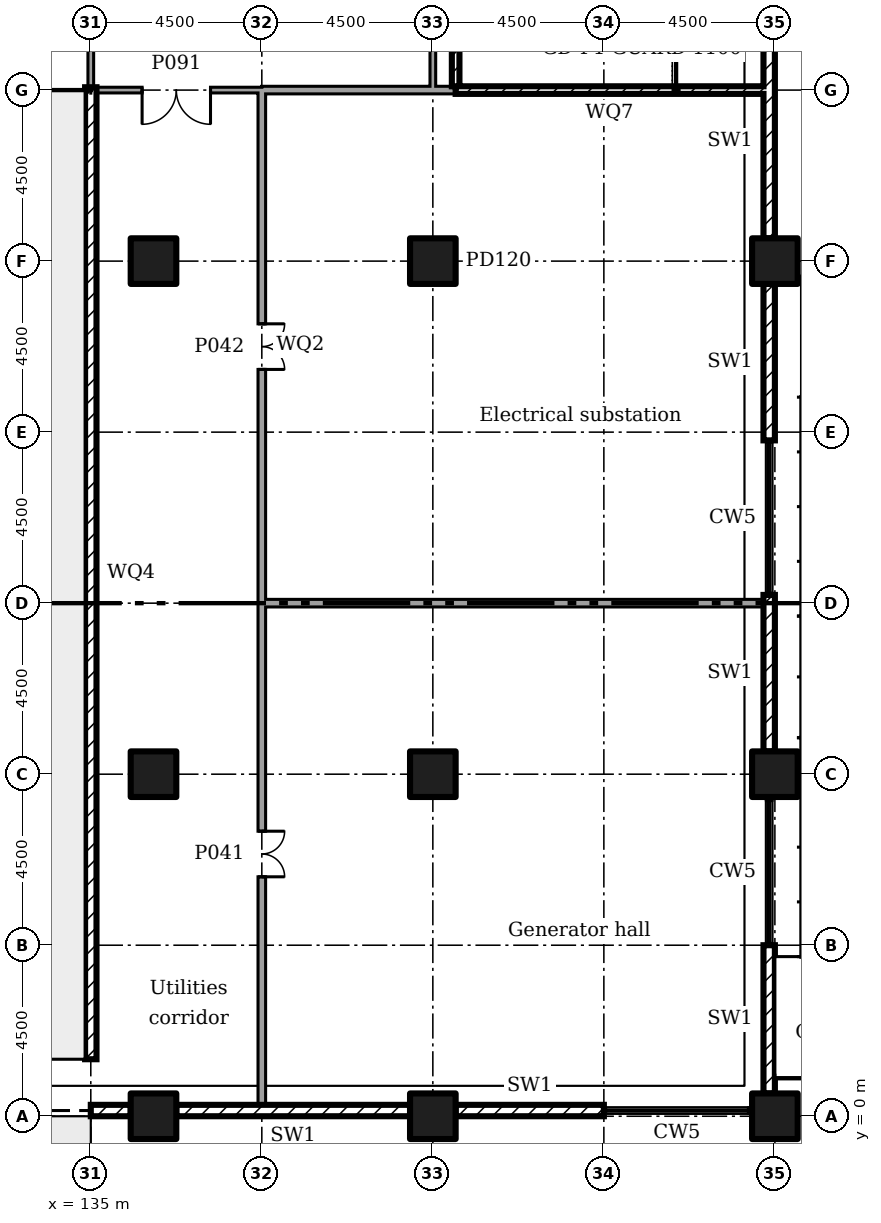
"""IFC4 building model, lengths in metres.
Left out: names, types, materials, properties, quantities, classifications, styles, units other than length and angle.
Written with IfcOpenShell. Run it as: python <this file> out.ifc"""

import sys

from ifc_helpers import new_model, si_unit, direction, frame, frame_2d, origin, origin_2d, place, context, subcontext, project, spatial, rectangle, extrude, element, fill, save


model = new_model("IFC4")
c1 = context("Model", 3, precision=1e-05, world=origin(), true_north=direction((0.0, 1.0)))
c2 = subcontext(c1, "Body", "Model", "MODEL_VIEW")
j1 = project(units=[si_unit("LENGTHUNIT", "METRE"), si_unit("PLANEANGLEUNIT", "RADIAN")], contexts=[c1])
p1 = place(None, origin())
s1 = spatial("IfcSite", under=j1, at=p1, CompositionType="ELEMENT")
p2 = place(p1, origin())
s2 = spatial("IfcBuilding", under=s1, at=p2, CompositionType="ELEMENT")
p3 = place(p2, origin())
s3 = spatial("IfcBuildingStorey", under=s2, at=p3, CompositionType="ELEMENT", Elevation=0.0)
for number, where in (
    (1, (136.65, 0.0, 0.0)),
    (2, (136.65, 9.0, 0.0)),
    (3, (136.65, 22.5, 0.0)),
    (4, (144.0, 0.0, 0.0)),
    (5, (144.0, 9.0, 0.0)),
    (6, (144.0, 22.5, 0.0)),
    (7, (153.0, 0.0, 0.0)),
    (8, (153.0, 9.0, 0.0)),
    (9, (153.0, 22.5, 0.0)),
):
    element("IfcColumn", number, at=place(p3, frame(where)), inside=s3, PredefinedType="COLUMN", context=c2, shape_type="SweptSolid", body=[
        extrude(rectangle(XDim=1.2, YDim=1.2, at=origin_2d()), origin(), (0.0, 0.0, 1.0), 6.0),
    ])
p4 = place(p3, frame((125.5, 0.15, 0.0)))
e10 = element("IfcWall", 10, at=p4, inside=s3, PredefinedType="ELEMENTEDWALL", context=c2, shape_type="SweptSolid", body=[
    extrude(rectangle(XDim=10.0, YDim=0.3, at=frame_2d((5.0, 0.0))), origin(), (0.0, 0.0, 1.0), 4.05),
])
p5 = place(p4, frame((0.5, 0.0, 0.0)))
e11 = element("IfcOpeningElement", 11, at=p5, cuts=e10, PredefinedType="OPENING", context=c2, shape_type="SweptSolid", body=[
    extrude(rectangle(XDim=9.0, YDim=3.5, at=frame_2d((4.5, 1.75))), frame((0.0, 0.16, 0.0), z_axis=(0.0, -1.0, 0.0), x_axis=(1.0, 0.0, 0.0)), (0.0, 0.0, 1.0), 0.32),
])
p6 = place(p3, frame((135.5, 0.15, 0.0)))
e12 = element("IfcWall", 12, at=p6, inside=s3, PredefinedType="ELEMENTEDWALL", context=c2, shape_type="SweptSolid", body=[
    extrude(rectangle(XDim=0.55, YDim=0.3, at=frame_2d((0.275, 0.0))), origin(), (0.0, 0.0, 1.0), 4.05),
])
p7 = place(p3, frame((137.25, 0.15, 0.0)))
e13 = element("IfcWall", 13, at=p7, inside=s3, PredefinedType="ELEMENTEDWALL", context=c2, shape_type="SweptSolid", body=[
    extrude(rectangle(XDim=6.15, YDim=0.3, at=frame_2d((3.075, 0.0))), origin(), (0.0, 0.0, 1.0), 5.55),
])
p8 = place(p3, frame((144.6, 0.15, 0.0)))
e14 = element("IfcWall", 14, at=p8, inside=s3, PredefinedType="ELEMENTEDWALL", context=c2, shape_type="SweptSolid", body=[
    extrude(rectangle(XDim=3.9, YDim=0.3, at=frame_2d((1.95, 0.0))), origin(), (0.0, 0.0, 1.0), 5.55),
])
p9 = place(p3, frame((152.85, 0.6, 0.0), z_axis=(0.0, 0.0, 1.0), x_axis=(0.0, 1.0, 0.0)))
e15 = element("IfcWall", 15, at=p9, inside=s3, PredefinedType="ELEMENTEDWALL", context=c2, shape_type="SweptSolid", body=[
    extrude(rectangle(XDim=3.9, YDim=0.3, at=frame_2d((1.95, 0.0))), origin(), (0.0, 0.0, 1.0), 5.55),
])
for number, where, z_axis, x_axis in (
    (16, (152.85, 9.6, 0.0), (0.0, 0.0, 1.0), (0.0, 1.0, 0.0)),
    (17, (152.85, 17.783, 0.0), (0.0, 0.0, 1.0), (0.0, 1.0, 0.0)),
):
    element("IfcWall", number, at=place(p3, frame(where, z_axis=z_axis, x_axis=x_axis)), inside=s3, PredefinedType="ELEMENTEDWALL", context=c2, shape_type="SweptSolid", body=[
        extrude(rectangle(XDim=4.116, YDim=0.3, at=frame_2d((2.058, 0.0))), origin(), (0.0, 0.0, 1.0), 5.55),
    ])
p10 = place(p3, frame((152.85, 23.1, 0.0), z_axis=(0.0, 0.0, 1.0), x_axis=(0.0, 1.0, 0.0)))
e18 = element("IfcWall", 18, at=p10, inside=s3, PredefinedType="ELEMENTEDWALL", context=c2, shape_type="SweptSolid", body=[
    extrude(rectangle(XDim=5.1, YDim=0.3, at=frame_2d((2.55, 0.0))), origin(), (0.0, 0.0, 1.0), 5.55),
])
p11 = place(p3, frame((139.5, 0.3, 0.0), z_axis=(0.0, 0.0, 1.0), x_axis=(0.0, 1.0, 0.0)))
e19 = element("IfcWall", 19, at=p11, inside=s3, PredefinedType="SOLIDWALL", context=c2, shape_type="SweptSolid", body=[
    extrude(rectangle(XDim=13.3, YDim=0.2, at=frame_2d((6.65, 0.0))), origin(), (0.0, 0.0, 1.0), 5.55),
])
p12 = place(p11, frame((6.0, 0.0, 0.0)))
e20 = element("IfcOpeningElement", 20, at=p12, cuts=e19, PredefinedType="OPENING", context=c2, shape_type="SweptSolid", body=[
    extrude(rectangle(XDim=1.2, YDim=2.1, at=frame_2d((0.6, 1.05))), frame((0.0, 0.11, 0.0), z_axis=(0.0, -1.0, 0.0), x_axis=(1.0, 0.0, 0.0)), (0.0, 0.0, 1.0), 0.22),
])
p13 = place(p3, frame((139.5, 13.5, 0.0), z_axis=(0.0, 0.0, 1.0), x_axis=(0.0, 1.0, 0.0)))
e21 = element("IfcWall", 21, at=p13, inside=s3, PredefinedType="SOLIDWALL", context=c2, shape_type="SweptSolid", body=[
    extrude(rectangle(XDim=13.575, YDim=0.2, at=frame_2d((6.788, 0.0))), origin(), (0.0, 0.0, 1.0), 5.55),
])
p14 = place(p13, frame((6.15, 0.0, 0.0)))
e22 = element("IfcOpeningElement", 22, at=p14, cuts=e21, PredefinedType="OPENING", context=c2, shape_type="SweptSolid", body=[
    extrude(rectangle(XDim=1.2, YDim=2.1, at=frame_2d((0.6, 1.05))), frame((0.0, 0.11, 0.0), z_axis=(0.0, -1.0, 0.0), x_axis=(1.0, 0.0, 0.0)), (0.0, 0.0, 1.0), 0.22),
])
p15 = place(p3, frame((135.15, 27.0, 0.0)))
e23 = element("IfcWall", 23, at=p15, inside=s3, PredefinedType="PARTITIONING", context=c2, shape_type="SweptSolid", body=[
    extrude(rectangle(XDim=4.25, YDim=0.15, at=frame_2d((2.125, 0.0))), origin(), (0.0, 0.0, 1.0), 5.55),
])
p16 = place(p15, frame((1.2, 0.0, 0.0)))
e24 = element("IfcOpeningElement", 24, at=p16, cuts=e23, PredefinedType="OPENING", context=c2, shape_type="SweptSolid", body=[
    extrude(rectangle(XDim=1.8, YDim=2.1, at=frame_2d((0.9, 1.05))), frame((0.0, 0.085, 0.0), z_axis=(0.0, -1.0, 0.0), x_axis=(1.0, 0.0, 0.0)), (0.0, 0.0, 1.0), 0.17),
])
p17 = place(p3, frame((139.6, 13.5, 0.0)))
e25 = element("IfcWall", 25, at=p17, inside=s3, PredefinedType="SOLIDWALL", context=c2, shape_type="SweptSolid", body=[
    extrude(rectangle(XDim=13.1, YDim=0.2, at=frame_2d((6.55, 0.0))), origin(), (0.0, 0.0, 1.0), 5.55),
])
p18 = place(p3, frame((139.5, 27.0, 0.0)))
e26 = element("IfcWall", 26, at=p18, inside=s3, PredefinedType="SOLIDWALL", context=c2, shape_type="SweptSolid", body=[
    extrude(rectangle(XDim=4.575, YDim=0.2, at=frame_2d((2.288, 0.0))), origin(), (0.0, 0.0, 1.0), 5.55),
])
p19 = place(p3, frame((144.0, 27.0, 0.0)))
e27 = element("IfcWall", 27, at=p19, inside=s3, PredefinedType="SOLIDWALL", context=c2, shape_type="SweptSolid", body=[
    extrude(rectangle(XDim=0.7, YDim=0.2, at=frame_2d((0.35, 0.0))), origin(), (0.0, 0.0, 1.0), 5.55),
])
p20 = place(p3, frame((144.6, 27.0, 0.0)))
e28 = element("IfcWall", 28, at=p20, inside=s3, PredefinedType="SOLIDWALL", context=c2, shape_type="SweptSolid", body=[
    extrude(rectangle(XDim=8.1, YDim=0.2, at=frame_2d((4.05, 0.0))), origin(), (0.0, 0.0, 1.0), 5.55),
])
p21 = place(p3, frame((135.0, 27.0, 0.0), z_axis=(0.0, 0.0, 1.0), x_axis=(0.0, 1.0, 0.0)))
e29 = element("IfcWall", 29, at=p21, inside=s3, PredefinedType="PARTITIONING", context=c2, shape_type="SweptSolid", body=[
    extrude(rectangle(XDim=13.425, YDim=0.15, at=frame_2d((6.712, 0.0))), origin(), (0.0, 0.0, 1.0), 5.55),
])
p22 = place(p21, frame((6.25, 0.0, 0.0)))
e30 = element("IfcOpeningElement", 30, at=p22, cuts=e29, PredefinedType="OPENING", context=c2, shape_type="SweptSolid", body=[
    extrude(rectangle(XDim=1.0, YDim=2.1, at=frame_2d((0.5, 1.05))), frame((0.0, 0.085, 0.0), z_axis=(0.0, -1.0, 0.0), x_axis=(1.0, 0.0, 0.0)), (0.0, 0.0, 1.0), 0.17),
])
p23 = place(p3, frame((144.0, 27.1, 0.0), z_axis=(0.0, 0.0, 1.0), x_axis=(0.0, 1.0, 0.0)))
e31 = element("IfcWall", 31, at=p23, inside=s3, PredefinedType="PARTITIONING", context=c2, shape_type="SweptSolid", body=[
    extrude(rectangle(XDim=8.305, YDim=0.15, at=frame_2d((4.152, 0.0))), origin(), (0.0, 0.0, 1.0), 5.55),
])
p24 = place(p23, frame((4.65, 0.0, 0.0)))
e32 = element("IfcOpeningElement", 32, at=p24, cuts=e31, PredefinedType="OPENING", context=c2, shape_type="SweptSolid", body=[
    extrude(rectangle(XDim=1.8, YDim=2.1, at=frame_2d((0.9, 1.05))), frame((0.0, 0.085, 0.0), z_axis=(0.0, -1.0, 0.0), x_axis=(1.0, 0.0, 0.0)), (0.0, 0.0, 1.0), 0.17),
])
p25 = place(p3, frame((144.6, 27.1, 0.0), z_axis=(0.0, 0.0, 1.0), x_axis=(0.0, 1.0, 0.0)))
e33 = element("IfcWall", 33, at=p25, inside=s3, PredefinedType="SOLIDWALL", context=c2, shape_type="SweptSolid", body=[
    extrude(rectangle(XDim=4.5, YDim=0.2, at=frame_2d((2.25, 0.0))), origin(), (0.0, 0.0, 1.0), 5.55),
])
p26 = place(p3, frame((135.0, 1.5, 0.0), z_axis=(0.0, 0.0, 1.0), x_axis=(0.0, 1.0, 0.0)))
e34 = element("IfcWall", 34, at=p26, inside=s3, PredefinedType="SOLIDWALL", context=c2, shape_type="SweptSolid", body=[
    extrude(rectangle(XDim=25.575, YDim=0.3, at=frame_2d((12.788, 0.0))), origin(), (0.0, 0.0, 1.0), 1.1),
])
p27 = place(p5, origin())
e35 = element("IfcDoor", 35, at=p27, inside=s3, OperationType="ROLLINGUP", PredefinedType="NOTDEFINED", context=c2, shape_type="SweptSolid", body=[
    extrude(rectangle(XDim=9.0, YDim=3.5, at=frame_2d((4.5, 1.75))), frame((0.0, 0.025, 0.0), z_axis=(0.0, -1.0, 0.0), x_axis=(1.0, 0.0, 0.0)), (0.0, 0.0, 1.0), 0.05),
])
fill(e11, e35)
p28 = place(p12, frame((1.2, 0.0, 0.0), x_axis=(-1.0, 0.0, 0.0)))
e36 = element("IfcDoor", 36, at=p28, inside=s3, OperationType="DOUBLE_DOOR_SINGLE_SWING", PredefinedType="DOOR", context=c2, shape_type="SweptSolid", body=[
    extrude(rectangle(XDim=1.2, YDim=2.1, at=frame_2d((0.6, 1.05))), frame((0.0, 0.025, 0.0), z_axis=(0.0, -1.0, 0.0), x_axis=(1.0, 0.0, 0.0)), (0.0, 0.0, 1.0), 0.05),
])
fill(e20, e36)
p29 = place(p14, frame((1.2, 0.0, 0.0), x_axis=(-1.0, 0.0, 0.0)))
e37 = element("IfcDoor", 37, at=p29, inside=s3, OperationType="DOUBLE_DOOR_SINGLE_SWING", PredefinedType="DOOR", context=c2, shape_type="SweptSolid", body=[
    extrude(rectangle(XDim=1.2, YDim=2.1, at=frame_2d((0.6, 1.05))), frame((0.0, 0.025, 0.0), z_axis=(0.0, -1.0, 0.0), x_axis=(1.0, 0.0, 0.0)), (0.0, 0.0, 1.0), 0.05),
])
fill(e22, e37)
p30 = place(p16, frame((1.8, 0.0, 0.0), x_axis=(-1.0, 0.0, 0.0)))
e38 = element("IfcDoor", 38, at=p30, inside=s3, OperationType="DOUBLE_DOOR_SINGLE_SWING", PredefinedType="DOOR", context=c2, shape_type="SweptSolid", body=[
    extrude(rectangle(XDim=1.8, YDim=2.1, at=frame_2d((0.9, 1.05))), frame((0.0, 0.025, 0.0), z_axis=(0.0, -1.0, 0.0), x_axis=(1.0, 0.0, 0.0)), (0.0, 0.0, 1.0), 0.05),
])
fill(e24, e38)
save(model, sys.argv[1])
